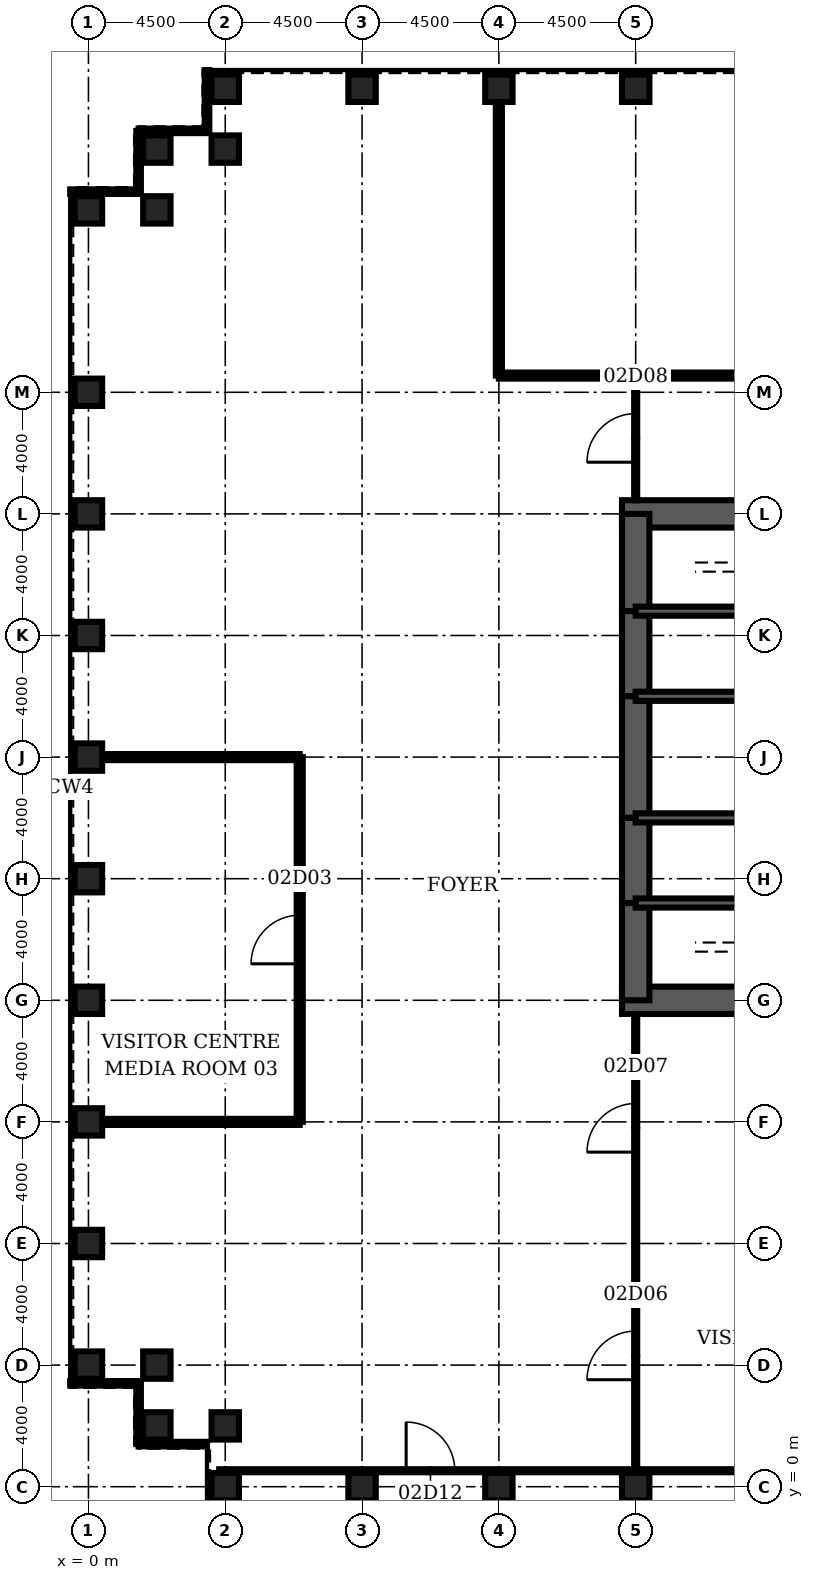
"""IFC4 building model, lengths in metres.
Left out: names, types, materials, properties, quantities, classifications, styles, units other than length and angle.
Written with IfcOpenShell. Run it as: python <this file> out.ifc"""

import sys

from ifc_helpers import new_model, si_unit, direction, frame, frame_2d, origin, origin_2d, place, context, subcontext, project, spatial, rectangle, hollow_rectangle, extrude, element, fill, save


model = new_model("IFC4")
c1 = context("Model", 3, precision=1e-05, world=origin(), true_north=direction((0.0, 1.0)))
c2 = subcontext(c1, "Body", "Model", "MODEL_VIEW")
j1 = project(units=[si_unit("LENGTHUNIT", "METRE"), si_unit("PLANEANGLEUNIT", "RADIAN")], contexts=[c1])
p1 = place(None, origin())
s1 = spatial("IfcSite", under=j1, at=p1, CompositionType="ELEMENT")
p2 = place(p1, origin())
s2 = spatial("IfcBuilding", under=s1, at=p2, CompositionType="ELEMENT")
p3 = place(p2, frame((0.0, 0.0, 13.0)))
s3 = spatial("IfcBuildingStorey", under=s2, at=p3, CompositionType="ELEMENT", Elevation=13.0)
for number, where, z_axis, x_axis in (
    (1, (4.5, 0.0, 0.0), (0.0, 0.0, 1.0), (0.0, 1.0, 0.0)),
    (2, (9.0, 0.0, 0.0), (0.0, 0.0, 1.0), (0.0, 1.0, 0.0)),
    (3, (13.5, 0.0, 0.0), (0.0, 0.0, 1.0), (0.0, 1.0, 0.0)),
    (4, (18.0, 0.0, 0.0), (0.0, 0.0, 1.0), (0.0, 1.0, 0.0)),
    (5, (18.0, 46.0, 0.0), (0.0, 0.0, 1.0), (0.0, 1.0, 0.0)),
    (6, (13.5, 46.0, 0.0), (0.0, 0.0, 1.0), (0.0, 1.0, 0.0)),
    (7, (9.0, 46.0, 0.0), (0.0, 0.0, 1.0), (0.0, 1.0, 0.0)),
    (8, (4.5, 46.0, 0.0), (0.0, 0.0, 1.0), (0.0, 1.0, 0.0)),
    (9, (4.5, 44.0, 0.0), (0.0, 0.0, 1.0), (0.0, 1.0, 0.0)),
    (10, (2.25, 44.0, 0.0), (0.0, 0.0, 1.0), (1.0, 0.0, 0.0)),
    (11, (2.25, 42.0, 0.0), (0.0, 0.0, 1.0), (1.0, 0.0, 0.0)),
    (12, (0.0, 42.0, 0.0), (0.0, 0.0, 1.0), (1.0, 0.0, 0.0)),
    (13, (0.0, 36.0, 0.0), (0.0, 0.0, 1.0), (1.0, 0.0, 0.0)),
    (14, (0.0, 32.0, 0.0), (0.0, 0.0, 1.0), (1.0, 0.0, 0.0)),
    (15, (0.0, 28.0, 0.0), (0.0, 0.0, 1.0), (1.0, 0.0, 0.0)),
    (16, (0.0, 24.0, 0.0), (0.0, 0.0, 1.0), (1.0, 0.0, 0.0)),
    (17, (0.0, 20.0, 0.0), (0.0, 0.0, 1.0), (1.0, 0.0, 0.0)),
    (18, (0.0, 16.0, 0.0), (0.0, 0.0, 1.0), (1.0, 0.0, 0.0)),
    (19, (0.0, 12.0, 0.0), (0.0, 0.0, 1.0), (1.0, 0.0, 0.0)),
    (20, (0.0, 8.0, 0.0), (0.0, 0.0, 1.0), (1.0, 0.0, 0.0)),
    (21, (0.0, 4.0, 0.0), (0.0, 0.0, 1.0), (1.0, 0.0, 0.0)),
    (22, (2.25, 4.0, 0.0), (0.0, 0.0, 1.0), (1.0, 0.0, 0.0)),
    (23, (2.25, 2.0, 0.0), (0.0, 0.0, 1.0), (1.0, 0.0, 0.0)),
    (24, (4.5, 2.0, 0.0), (0.0, 0.0, 1.0), (0.0, 1.0, 0.0)),
):
    element("IfcColumn", number, at=place(p3, frame(where, z_axis=z_axis, x_axis=x_axis)), inside=s3, PredefinedType="COLUMN", context=c2, shape_type="SweptSolid", body=[
        extrude(hollow_rectangle(XDim=0.9, YDim=0.9, WallThickness=0.12, at=origin_2d()), origin(), (0.0, 0.0, 1.0), 5.0),
    ])
for number, where, z_axis, x_axis in (
    (25, (17.55, 16.0, 0.0), (0.0, 0.0, 1.0), (1.0, 0.0, 0.0)),
    (26, (27.0, 32.0, 0.0), (0.0, 0.0, 1.0), (-1.0, 0.0, 0.0)),
):
    element("IfcWall", number, at=place(p3, frame(where, z_axis=z_axis, x_axis=x_axis)), inside=s3, PredefinedType="SHEAR", context=c2, shape_type="SweptSolid", body=[
        extrude(rectangle(XDim=9.45, YDim=0.9, at=frame_2d((4.725, 0.0))), origin(), (0.0, 0.0, 1.0), 5.0),
    ])
p4 = place(p3, frame((18.0, 32.0, 0.0), z_axis=(0.0, 0.0, 1.0), x_axis=(0.0, -1.0, 0.0)))
e27 = element("IfcWall", 27, at=p4, inside=s3, PredefinedType="SHEAR", context=c2, shape_type="SweptSolid", body=[
    extrude(rectangle(XDim=3.2, YDim=0.9, at=frame_2d((1.6, 0.0))), origin(), (0.0, 0.0, 1.0), 5.0),
])
p5 = place(p3, frame((18.0, 28.8, 0.0), z_axis=(0.0, 0.0, 1.0), x_axis=(0.0, -1.0, 0.0)))
e28 = element("IfcWall", 28, at=p5, inside=s3, PredefinedType="SHEAR", context=c2, shape_type="SweptSolid", body=[
    extrude(rectangle(XDim=2.8, YDim=0.9, at=frame_2d((1.4, 0.0))), origin(), (0.0, 0.0, 1.0), 5.0),
])
p6 = place(p5, frame((0.4, 0.0, 0.0)))
e29 = element("IfcOpeningElement", 29, at=p6, cuts=e28, PredefinedType="OPENING", context=c2, shape_type="SweptSolid", body=[
    extrude(rectangle(XDim=1.8, YDim=2.1, at=frame_2d((0.9, 1.05))), frame((0.0, 0.46, 0.0), z_axis=(0.0, -1.0, 0.0), x_axis=(1.0, 0.0, 0.0)), (0.0, 0.0, 1.0), 0.92),
])
p7 = place(p3, frame((18.0, 26.0, 0.0), z_axis=(0.0, 0.0, 1.0), x_axis=(0.0, -1.0, 0.0)))
e30 = element("IfcWall", 30, at=p7, inside=s3, PredefinedType="SHEAR", context=c2, shape_type="SweptSolid", body=[
    extrude(rectangle(XDim=4.0, YDim=0.9, at=frame_2d((2.0, 0.0))), origin(), (0.0, 0.0, 1.0), 5.0),
])
p8 = place(p3, frame((18.0, 22.0, 0.0), z_axis=(0.0, 0.0, 1.0), x_axis=(0.0, -1.0, 0.0)))
e31 = element("IfcWall", 31, at=p8, inside=s3, PredefinedType="SHEAR", context=c2, shape_type="SweptSolid", body=[
    extrude(rectangle(XDim=2.8, YDim=0.9, at=frame_2d((1.4, 0.0))), origin(), (0.0, 0.0, 1.0), 5.0),
])
p9 = place(p8, frame((0.6, 0.0, 0.0)))
e32 = element("IfcOpeningElement", 32, at=p9, cuts=e31, PredefinedType="OPENING", context=c2, shape_type="SweptSolid", body=[
    extrude(rectangle(XDim=1.8, YDim=2.1, at=frame_2d((0.9, 1.05))), frame((0.0, 0.46, 0.0), z_axis=(0.0, -1.0, 0.0), x_axis=(1.0, 0.0, 0.0)), (0.0, 0.0, 1.0), 0.92),
])
p10 = place(p3, frame((18.0, 19.2, 0.0), z_axis=(0.0, 0.0, 1.0), x_axis=(0.0, -1.0, 0.0)))
e33 = element("IfcWall", 33, at=p10, inside=s3, PredefinedType="SHEAR", context=c2, shape_type="SweptSolid", body=[
    extrude(rectangle(XDim=3.2, YDim=0.9, at=frame_2d((1.6, 0.0))), origin(), (0.0, 0.0, 1.0), 5.0),
])
p11 = place(p3, frame((18.0, 19.2, 0.0), z_axis=(0.0, 0.0, 1.0), x_axis=(1.0, 0.0, 0.0)))
e34 = element("IfcWall", 34, at=p11, inside=s3, PredefinedType="SOLIDWALL", context=c2, shape_type="SweptSolid", body=[
    extrude(rectangle(XDim=9.0, YDim=0.3, at=frame_2d((4.5, 0.0))), origin(), (0.0, 0.0, 1.0), 5.0),
])
p12 = place(p11, frame((0.65, 0.0, 0.0)))
e35 = element("IfcOpeningElement", 35, at=p12, cuts=e34, PredefinedType="OPENING", context=c2, shape_type="SweptSolid", body=[
    extrude(rectangle(XDim=1.0, YDim=2.1, at=frame_2d((0.5, 1.05))), frame((0.0, 0.16, 0.0), z_axis=(0.0, -1.0, 0.0), x_axis=(1.0, 0.0, 0.0)), (0.0, 0.0, 1.0), 0.32),
])
p13 = place(p3, frame((18.0, 28.8, 0.0), z_axis=(0.0, 0.0, 1.0), x_axis=(1.0, 0.0, 0.0)))
e36 = element("IfcWall", 36, at=p13, inside=s3, PredefinedType="SOLIDWALL", context=c2, shape_type="SweptSolid", body=[
    extrude(rectangle(XDim=9.0, YDim=0.3, at=frame_2d((4.5, 0.0))), origin(), (0.0, 0.0, 1.0), 5.0),
])
p14 = place(p13, frame((0.65, 0.0, 0.0)))
e37 = element("IfcOpeningElement", 37, at=p14, cuts=e36, PredefinedType="OPENING", context=c2, shape_type="SweptSolid", body=[
    extrude(rectangle(XDim=1.0, YDim=2.1, at=frame_2d((0.5, 1.05))), frame((0.0, 0.16, 0.0), z_axis=(0.0, -1.0, 0.0), x_axis=(1.0, 0.0, 0.0)), (0.0, 0.0, 1.0), 0.32),
])
p15 = place(p3, frame((18.0, 22.0, 0.0), z_axis=(0.0, 0.0, 1.0), x_axis=(1.0, 0.0, 0.0)))
e38 = element("IfcWall", 38, at=p15, inside=s3, PredefinedType="SOLIDWALL", context=c2, shape_type="SweptSolid", body=[
    extrude(rectangle(XDim=6.0, YDim=0.3, at=frame_2d((3.0, 0.0))), origin(), (0.0, 0.0, 1.0), 5.0),
])
p16 = place(p15, frame((4.4, 0.0, 0.0)))
e39 = element("IfcOpeningElement", 39, at=p16, cuts=e38, PredefinedType="OPENING", context=c2, shape_type="SweptSolid", body=[
    extrude(rectangle(XDim=1.0, YDim=2.1, at=frame_2d((0.5, 1.05))), frame((0.0, 0.16, 0.0), z_axis=(0.0, -1.0, 0.0), x_axis=(1.0, 0.0, 0.0)), (0.0, 0.0, 1.0), 0.32),
])
p17 = place(p15, frame((0.85, 0.0, 0.0)))
e40 = element("IfcOpeningElement", 40, at=p17, cuts=e38, PredefinedType="OPENING", context=c2, shape_type="SweptSolid", body=[
    extrude(rectangle(XDim=1.0, YDim=2.1, at=frame_2d((0.5, 1.05))), frame((0.0, 0.16, 0.0), z_axis=(0.0, -1.0, 0.0), x_axis=(1.0, 0.0, 0.0)), (0.0, 0.0, 1.0), 0.32),
])
p18 = place(p3, frame((18.0, 26.0, 0.0), z_axis=(0.0, 0.0, 1.0), x_axis=(1.0, 0.0, 0.0)))
e41 = element("IfcWall", 41, at=p18, inside=s3, PredefinedType="SOLIDWALL", context=c2, shape_type="SweptSolid", body=[
    extrude(rectangle(XDim=6.0, YDim=0.3, at=frame_2d((3.0, 0.0))), origin(), (0.0, 0.0, 1.0), 5.0),
])
p19 = place(p3, frame((20.325, 22.15, 0.0), z_axis=(0.0, 0.0, 1.0), x_axis=(0.0, 1.0, 0.0)))
e42 = element("IfcWall", 42, at=p19, inside=s3, PredefinedType="PARTITIONING", context=c2, shape_type="SweptSolid", body=[
    extrude(rectangle(XDim=3.7, YDim=0.15, at=frame_2d((1.85, 0.0))), origin(), (0.0, 0.0, 1.0), 3.0),
])
for number, where, z_axis, x_axis in (
    (43, (0.45, 12.0, 0.0), (0.0, 0.0, 1.0), (1.0, 0.0, 0.0)),
    (44, (0.45, 24.0, 0.0), (0.0, 0.0, 1.0), (1.0, 0.0, 0.0)),
):
    element("IfcWall", number, at=place(p3, frame(where, z_axis=z_axis, x_axis=x_axis)), inside=s3, PredefinedType="PARTITIONING", context=c2, shape_type="SweptSolid", body=[
        extrude(rectangle(XDim=6.5, YDim=0.2, at=frame_2d((3.25, 0.0))), origin(), (0.0, 0.0, 1.0), 3.0),
    ])
p20 = place(p3, frame((13.5, 36.55, 0.0), z_axis=(0.0, 0.0, 1.0), x_axis=(1.0, 0.0, 0.0)))
e45 = element("IfcWall", 45, at=p20, inside=s3, PredefinedType="PARTITIONING", context=c2, shape_type="SweptSolid", body=[
    extrude(rectangle(XDim=45.0, YDim=0.2, at=frame_2d((22.5, 0.0))), origin(), (0.0, 0.0, 1.0), 3.0),
])
p21 = place(p20, frame((21.7, 0.0, 0.0)))
e46 = element("IfcOpeningElement", 46, at=p21, cuts=e45, PredefinedType="OPENING", context=c2, shape_type="SweptSolid", body=[
    extrude(rectangle(XDim=1.6, YDim=2.1, at=frame_2d((0.8, 1.05))), frame((0.0, 0.11, 0.0), z_axis=(0.0, -1.0, 0.0), x_axis=(1.0, 0.0, 0.0)), (0.0, 0.0, 1.0), 0.22),
])
p22 = place(p3, frame((6.95, 12.0, 0.0), z_axis=(0.0, 0.0, 1.0), x_axis=(0.0, 1.0, 0.0)))
e47 = element("IfcWall", 47, at=p22, inside=s3, PredefinedType="PARTITIONING", context=c2, shape_type="SweptSolid", body=[
    extrude(rectangle(XDim=12.0, YDim=0.2, at=frame_2d((6.0, 0.0))), origin(), (0.0, 0.0, 1.0), 3.0),
])
p23 = place(p22, frame((5.2, 0.0, 0.0)))
e48 = element("IfcOpeningElement", 48, at=p23, cuts=e47, PredefinedType="OPENING", context=c2, shape_type="SweptSolid", body=[
    extrude(rectangle(XDim=1.6, YDim=2.1, at=frame_2d((0.8, 1.05))), frame((0.0, 0.11, 0.0), z_axis=(0.0, -1.0, 0.0), x_axis=(1.0, 0.0, 0.0)), (0.0, 0.0, 1.0), 0.22),
])
p24 = place(p3, frame((13.5, 36.55, 0.0), z_axis=(0.0, 0.0, 1.0), x_axis=(0.0, 1.0, 0.0)))
e49 = element("IfcWall", 49, at=p24, inside=s3, PredefinedType="PARTITIONING", context=c2, shape_type="SweptSolid", body=[
    extrude(rectangle(XDim=9.0, YDim=0.2, at=frame_2d((4.5, 0.0))), origin(), (0.0, 0.0, 1.0), 3.0),
])
p25 = place(p3, frame((18.0, 0.575, 0.0), z_axis=(0.0, 0.0, 1.0), x_axis=(0.0, 1.0, 0.0)))
e50 = element("IfcWall", 50, at=p25, inside=s3, PredefinedType="PARTITIONING", context=c2, shape_type="SweptSolid", body=[
    extrude(rectangle(XDim=14.975, YDim=0.1, at=frame_2d((7.488, 0.0))), origin(), (0.0, 0.0, 1.0), 3.0),
])
p26 = place(p25, frame((2.944, 0.0, 0.0)))
e51 = element("IfcOpeningElement", 51, at=p26, cuts=e50, PredefinedType="OPENING", context=c2, shape_type="SweptSolid", body=[
    extrude(rectangle(XDim=1.6, YDim=2.1, at=frame_2d((0.8, 1.05))), frame((0.0, 0.06, 0.0), z_axis=(0.0, -1.0, 0.0), x_axis=(1.0, 0.0, 0.0)), (0.0, 0.0, 1.0), 0.12),
])
p27 = place(p25, frame((10.431, 0.0, 0.0)))
e52 = element("IfcOpeningElement", 52, at=p27, cuts=e50, PredefinedType="OPENING", context=c2, shape_type="SweptSolid", body=[
    extrude(rectangle(XDim=1.6, YDim=2.1, at=frame_2d((0.8, 1.05))), frame((0.0, 0.06, 0.0), z_axis=(0.0, -1.0, 0.0), x_axis=(1.0, 0.0, 0.0)), (0.0, 0.0, 1.0), 0.12),
])
p28 = place(p3, frame((18.0, 32.45, 0.0), z_axis=(0.0, 0.0, 1.0), x_axis=(0.0, 1.0, 0.0)))
e53 = element("IfcWall", 53, at=p28, inside=s3, PredefinedType="PARTITIONING", context=c2, shape_type="SweptSolid", body=[
    extrude(rectangle(XDim=4.1, YDim=0.1, at=frame_2d((2.05, 0.0))), origin(), (0.0, 0.0, 1.0), 3.0),
])
p29 = place(p28, frame((1.25, 0.0, 0.0)))
e54 = element("IfcOpeningElement", 54, at=p29, cuts=e53, PredefinedType="OPENING", context=c2, shape_type="SweptSolid", body=[
    extrude(rectangle(XDim=1.6, YDim=2.1, at=frame_2d((0.8, 1.05))), frame((0.0, 0.06, 0.0), z_axis=(0.0, -1.0, 0.0), x_axis=(1.0, 0.0, 0.0)), (0.0, 0.0, 1.0), 0.12),
])
p30 = place(p3, frame((4.3, 0.525, 0.0), z_axis=(0.0, 0.0, 1.0), x_axis=(1.0, 0.0, 0.0)))
e55 = element("IfcWall", 55, at=p30, inside=s3, PredefinedType="PARTITIONING", context=c2, shape_type="SweptSolid", body=[
    extrude(rectangle(XDim=18.2, YDim=0.1, at=frame_2d((9.1, 0.0))), origin(), (0.0, 0.0, 1.0), 3.0),
])
p31 = place(p30, frame((6.15, 0.0, 0.0)))
e56 = element("IfcOpeningElement", 56, at=p31, cuts=e55, PredefinedType="OPENING", context=c2, shape_type="SweptSolid", body=[
    extrude(rectangle(XDim=1.6, YDim=2.1, at=frame_2d((0.8, 1.05))), frame((0.0, 0.06, 0.0), z_axis=(0.0, -1.0, 0.0), x_axis=(1.0, 0.0, 0.0)), (0.0, 0.0, 1.0), 0.12),
])
p32 = place(p3, frame((3.9, 46.6, 0.0), z_axis=(0.0, 0.0, 1.0), x_axis=(0.0, -1.0, 0.0)))
e57 = element("IfcWall", 57, at=p32, inside=s3, PredefinedType="ELEMENTEDWALL", context=c2, shape_type="SweptSolid", body=[
    extrude(rectangle(XDim=2.0, YDim=0.15, at=frame_2d((1.0, 0.0))), origin(), (0.0, 0.0, 1.0), 4.82),
])
p33 = place(p3, frame((3.9, 44.6, 0.0), z_axis=(0.0, 0.0, 1.0), x_axis=(-1.0, 0.0, 0.0)))
e58 = element("IfcWall", 58, at=p33, inside=s3, PredefinedType="ELEMENTEDWALL", context=c2, shape_type="SweptSolid", body=[
    extrude(rectangle(XDim=2.25, YDim=0.15, at=frame_2d((1.125, 0.0))), origin(), (0.0, 0.0, 1.0), 4.82),
])
p34 = place(p3, frame((1.65, 44.6, 0.0), z_axis=(0.0, 0.0, 1.0), x_axis=(0.0, -1.0, 0.0)))
e59 = element("IfcWall", 59, at=p34, inside=s3, PredefinedType="ELEMENTEDWALL", context=c2, shape_type="SweptSolid", body=[
    extrude(rectangle(XDim=2.0, YDim=0.15, at=frame_2d((1.0, 0.0))), origin(), (0.0, 0.0, 1.0), 4.82),
])
for number, where, z_axis, x_axis in (
    (60, (1.65, 42.6, 0.0), (0.0, 0.0, 1.0), (-1.0, 0.0, 0.0)),
    (61, (-0.6, 3.4, 0.0), (0.0, 0.0, 1.0), (1.0, 0.0, 0.0)),
):
    element("IfcWall", number, at=place(p3, frame(where, z_axis=z_axis, x_axis=x_axis)), inside=s3, PredefinedType="ELEMENTEDWALL", context=c2, shape_type="SweptSolid", body=[
        extrude(rectangle(XDim=2.25, YDim=0.15, at=frame_2d((1.125, 0.0))), origin(), (0.0, 0.0, 1.0), 4.82),
    ])
p35 = place(p3, frame((1.65, 3.4, 0.0), z_axis=(0.0, 0.0, 1.0), x_axis=(0.0, -1.0, 0.0)))
e62 = element("IfcWall", 62, at=p35, inside=s3, PredefinedType="ELEMENTEDWALL", context=c2, shape_type="SweptSolid", body=[
    extrude(rectangle(XDim=2.0, YDim=0.15, at=frame_2d((1.0, 0.0))), origin(), (0.0, 0.0, 1.0), 4.82),
])
p36 = place(p3, frame((1.65, 1.4, 0.0), z_axis=(0.0, 0.0, 1.0), x_axis=(1.0, 0.0, 0.0)))
e63 = element("IfcWall", 63, at=p36, inside=s3, PredefinedType="ELEMENTEDWALL", context=c2, shape_type="SweptSolid", body=[
    extrude(rectangle(XDim=2.25, YDim=0.15, at=frame_2d((1.125, 0.0))), origin(), (0.0, 0.0, 1.0), 4.82),
])
p37 = place(p23, origin())
e64 = element("IfcDoor", 64, at=p37, inside=s3, OperationType="SINGLE_SWING_LEFT", PredefinedType="DOOR", context=c2, shape_type="SweptSolid", body=[
    extrude(rectangle(XDim=1.6, YDim=2.1, at=frame_2d((0.8, 1.05))), frame((0.0, 0.025, 0.0), z_axis=(0.0, -1.0, 0.0), x_axis=(1.0, 0.0, 0.0)), (0.0, 0.0, 1.0), 0.05),
])
fill(e48, e64)
p38 = place(p26, origin())
e65 = element("IfcDoor", 65, at=p38, inside=s3, OperationType="SINGLE_SWING_LEFT", PredefinedType="DOOR", context=c2, shape_type="SweptSolid", body=[
    extrude(rectangle(XDim=1.6, YDim=2.1, at=frame_2d((0.8, 1.05))), frame((0.0, 0.025, 0.0), z_axis=(0.0, -1.0, 0.0), x_axis=(1.0, 0.0, 0.0)), (0.0, 0.0, 1.0), 0.05),
])
fill(e51, e65)
p39 = place(p27, origin())
e66 = element("IfcDoor", 66, at=p39, inside=s3, OperationType="SINGLE_SWING_LEFT", PredefinedType="DOOR", context=c2, shape_type="SweptSolid", body=[
    extrude(rectangle(XDim=1.6, YDim=2.1, at=frame_2d((0.8, 1.05))), frame((0.0, 0.025, 0.0), z_axis=(0.0, -1.0, 0.0), x_axis=(1.0, 0.0, 0.0)), (0.0, 0.0, 1.0), 0.05),
])
fill(e52, e66)
p40 = place(p29, origin())
e67 = element("IfcDoor", 67, at=p40, inside=s3, OperationType="SINGLE_SWING_LEFT", PredefinedType="DOOR", context=c2, shape_type="SweptSolid", body=[
    extrude(rectangle(XDim=1.6, YDim=2.1, at=frame_2d((0.8, 1.05))), frame((0.0, 0.025, 0.0), z_axis=(0.0, -1.0, 0.0), x_axis=(1.0, 0.0, 0.0)), (0.0, 0.0, 1.0), 0.05),
])
fill(e54, e67)
p41 = place(p31, origin())
e68 = element("IfcDoor", 68, at=p41, inside=s3, OperationType="SINGLE_SWING_LEFT", PredefinedType="DOOR", context=c2, shape_type="SweptSolid", body=[
    extrude(rectangle(XDim=1.6, YDim=2.1, at=frame_2d((0.8, 1.05))), frame((0.0, 0.025, 0.0), z_axis=(0.0, -1.0, 0.0), x_axis=(1.0, 0.0, 0.0)), (0.0, 0.0, 1.0), 0.05),
])
fill(e56, e68)
p42 = place(p12, origin())
e69 = element("IfcDoor", 69, at=p42, inside=s3, OperationType="SINGLE_SWING_LEFT", PredefinedType="DOOR", context=c2, shape_type="SweptSolid", body=[
    extrude(rectangle(XDim=1.0, YDim=2.1, at=frame_2d((0.5, 1.05))), frame((0.0, 0.025, 0.0), z_axis=(0.0, -1.0, 0.0), x_axis=(1.0, 0.0, 0.0)), (0.0, 0.0, 1.0), 0.05),
])
fill(e35, e69)
p43 = place(p14, origin())
e70 = element("IfcDoor", 70, at=p43, inside=s3, OperationType="SINGLE_SWING_LEFT", PredefinedType="DOOR", context=c2, shape_type="SweptSolid", body=[
    extrude(rectangle(XDim=1.0, YDim=2.1, at=frame_2d((0.5, 1.05))), frame((0.0, 0.025, 0.0), z_axis=(0.0, -1.0, 0.0), x_axis=(1.0, 0.0, 0.0)), (0.0, 0.0, 1.0), 0.05),
])
fill(e37, e70)
p44 = place(p9, origin())
e71 = element("IfcDoor", 71, at=p44, inside=s3, OperationType="SINGLE_SWING_LEFT", PredefinedType="DOOR", context=c2, shape_type="SweptSolid", body=[
    extrude(rectangle(XDim=1.8, YDim=2.1, at=frame_2d((0.9, 1.05))), frame((0.0, 0.45, 0.0), z_axis=(0.0, -1.0, 0.0), x_axis=(1.0, 0.0, 0.0)), (0.0, 0.0, 1.0), 0.899),
])
fill(e32, e71)
p45 = place(p6, origin())
e72 = element("IfcDoor", 72, at=p45, inside=s3, OperationType="SINGLE_SWING_LEFT", PredefinedType="DOOR", context=c2, shape_type="SweptSolid", body=[
    extrude(rectangle(XDim=1.8, YDim=2.1, at=frame_2d((0.9, 1.05))), frame((0.0, 0.45, 0.0), z_axis=(0.0, -1.0, 0.0), x_axis=(1.0, 0.0, 0.0)), (0.0, 0.0, 1.0), 0.899),
])
fill(e29, e72)
p46 = place(p17, origin())
e73 = element("IfcDoor", 73, at=p46, inside=s3, OperationType="SINGLE_SWING_LEFT", PredefinedType="DOOR", context=c2, shape_type="SweptSolid", body=[
    extrude(rectangle(XDim=1.0, YDim=2.1, at=frame_2d((0.5, 1.05))), frame((0.0, 0.025, 0.0), z_axis=(0.0, -1.0, 0.0), x_axis=(1.0, 0.0, 0.0)), (0.0, 0.0, 1.0), 0.05),
])
fill(e40, e73)
save(model, sys.argv[1])
